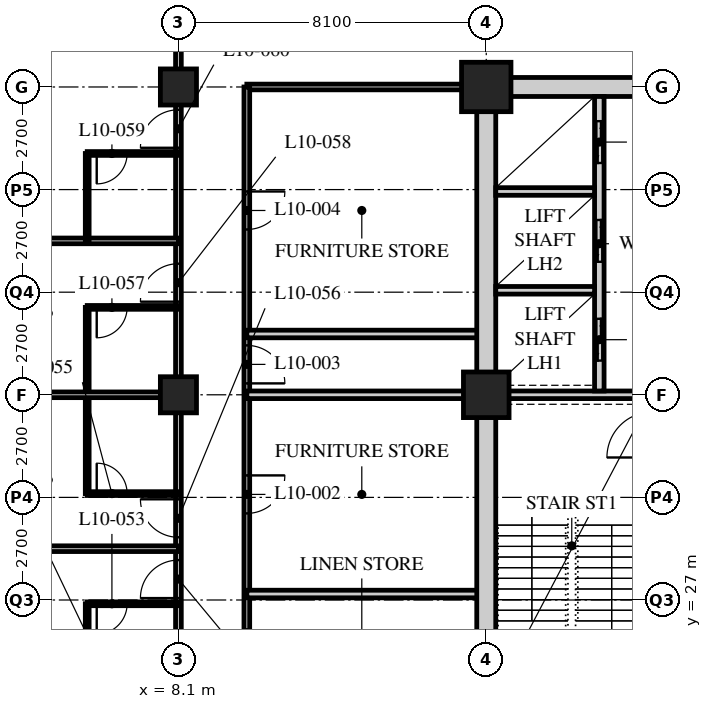
"""IFC4 building model, lengths in metres.
Left out: names, types, materials, properties, quantities, classifications, styles, units other than length and angle.
Written with IfcOpenShell. Run it as: python <this file> out.ifc"""

import sys

from ifc_helpers import new_model, si_unit, direction, frame, frame_2d, origin, origin_2d, place, context, subcontext, project, spatial, rectangle, hollow_rectangle, extrude, element, fill, save


model = new_model("IFC4")
c1 = context("Model", 3, precision=1e-05, world=origin(), true_north=direction((0.0, 1.0)))
c2 = subcontext(c1, "Body", "Model", "MODEL_VIEW")
j1 = project(units=[si_unit("LENGTHUNIT", "METRE"), si_unit("PLANEANGLEUNIT", "RADIAN")], contexts=[c1])
p1 = place(None, origin())
s1 = spatial("IfcSite", under=j1, at=p1, CompositionType="ELEMENT")
p2 = place(p1, origin())
s2 = spatial("IfcBuilding", under=s1, at=p2, CompositionType="ELEMENT")
p3 = place(p2, frame((0.0, 0.0, 46.6)))
s3 = spatial("IfcBuildingStorey", under=s2, at=p3, CompositionType="ELEMENT", Elevation=46.6)
for number, where, z_axis, x_axis in (
    (1, (8.1, 32.4, 0.0), (0.0, 0.0, 1.0), (1.0, 0.0, 0.0)),
    (2, (8.1, 40.5, 0.0), (0.0, 0.0, 1.0), (1.0, 0.0, 0.0)),
):
    element("IfcColumn", number, at=place(p3, frame(where, z_axis=z_axis, x_axis=x_axis)), inside=s3, PredefinedType="COLUMN", context=c2, shape_type="SweptSolid", body=[
        extrude(hollow_rectangle(XDim=0.95, YDim=0.95, WallThickness=0.095, at=origin_2d()), origin(), (0.0, 0.0, 1.0), 3.4),
    ])
p4 = place(p3, frame((16.2, 32.4, 0.0), z_axis=(0.0, 0.0, 1.0), x_axis=(1.0, 0.0, 0.0)))
e3 = element("IfcColumn", 3, at=p4, inside=s3, PredefinedType="COLUMN", context=c2, shape_type="SweptSolid", body=[
    extrude(hollow_rectangle(XDim=1.2, YDim=1.2, WallThickness=0.12, at=origin_2d()), origin(), (0.0, 0.0, 1.0), 3.4),
])
p5 = place(p3, frame((16.2, 40.5, 0.0), z_axis=(0.0, 0.0, 1.0), x_axis=(1.0, 0.0, 0.0)))
e4 = element("IfcColumn", 4, at=p5, inside=s3, PredefinedType="COLUMN", context=c2, shape_type="SweptSolid", body=[
    extrude(hollow_rectangle(XDim=1.3, YDim=1.3, WallThickness=0.13, at=origin_2d()), origin(), (0.0, 0.0, 1.0), 3.4),
])
p6 = place(p3, frame((8.1, 16.2, 0.0), z_axis=(0.0, 0.0, 1.0), x_axis=(0.0, 1.0, 0.0)))
e5 = element("IfcWall", 5, at=p6, inside=s3, PredefinedType="PARTITIONING", context=c2, shape_type="SweptSolid", body=[
    extrude(rectangle(XDim=26.1, YDim=0.15, at=frame_2d((13.05, 0.0))), origin(), (0.0, 0.0, 1.0), 2.578),
])
p7 = place(p6, frame((2.75, 0.0, 0.0)))
e6 = element("IfcOpeningElement", 6, at=p7, cuts=e5, PredefinedType="OPENING", context=c2, shape_type="SweptSolid", body=[
    extrude(rectangle(XDim=1.0, YDim=2.1, at=frame_2d((0.5, 1.05))), frame((0.0, 0.085, 0.0), z_axis=(0.0, -1.0, 0.0), x_axis=(1.0, 0.0, 0.0)), (0.0, 0.0, 1.0), 0.17),
])
p8 = place(p6, frame((4.35, 0.0, 0.0)))
e7 = element("IfcOpeningElement", 7, at=p8, cuts=e5, PredefinedType="OPENING", context=c2, shape_type="SweptSolid", body=[
    extrude(rectangle(XDim=1.0, YDim=2.1, at=frame_2d((0.5, 1.05))), frame((0.0, 0.085, 0.0), z_axis=(0.0, -1.0, 0.0), x_axis=(1.0, 0.0, 0.0)), (0.0, 0.0, 1.0), 0.17),
])
p9 = place(p6, frame((10.85, 0.0, 0.0)))
e8 = element("IfcOpeningElement", 8, at=p9, cuts=e5, PredefinedType="OPENING", context=c2, shape_type="SweptSolid", body=[
    extrude(rectangle(XDim=1.0, YDim=2.1, at=frame_2d((0.5, 1.05))), frame((0.0, 0.085, 0.0), z_axis=(0.0, -1.0, 0.0), x_axis=(1.0, 0.0, 0.0)), (0.0, 0.0, 1.0), 0.17),
])
p10 = place(p6, frame((12.45, 0.0, 0.0)))
e9 = element("IfcOpeningElement", 9, at=p10, cuts=e5, PredefinedType="OPENING", context=c2, shape_type="SweptSolid", body=[
    extrude(rectangle(XDim=1.0, YDim=2.1, at=frame_2d((0.5, 1.05))), frame((0.0, 0.085, 0.0), z_axis=(0.0, -1.0, 0.0), x_axis=(1.0, 0.0, 0.0)), (0.0, 0.0, 1.0), 0.17),
])
p11 = place(p6, frame((18.65, 0.0, 0.0)))
e10 = element("IfcOpeningElement", 10, at=p11, cuts=e5, PredefinedType="OPENING", context=c2, shape_type="SweptSolid", body=[
    extrude(rectangle(XDim=1.0, YDim=2.1, at=frame_2d((0.5, 1.05))), frame((0.0, 0.085, 0.0), z_axis=(0.0, -1.0, 0.0), x_axis=(1.0, 0.0, 0.0)), (0.0, 0.0, 1.0), 0.17),
])
p12 = place(p6, frame((22.7, 0.0, 0.0)))
e11 = element("IfcOpeningElement", 11, at=p12, cuts=e5, PredefinedType="OPENING", context=c2, shape_type="SweptSolid", body=[
    extrude(rectangle(XDim=1.0, YDim=2.1, at=frame_2d((0.5, 1.05))), frame((0.0, 0.085, 0.0), z_axis=(0.0, -1.0, 0.0), x_axis=(1.0, 0.0, 0.0)), (0.0, 0.0, 1.0), 0.17),
])
p13 = place(p3, frame((16.0, 40.5, 0.0), z_axis=(0.0, 0.0, 1.0), x_axis=(-1.0, 0.0, 0.0)))
e12 = element("IfcWall", 12, at=p13, inside=s3, PredefinedType="PARTITIONING", context=c2, shape_type="SweptSolid", body=[
    extrude(rectangle(XDim=6.1, YDim=0.15, at=frame_2d((3.05, 0.0))), origin(), (0.0, 0.0, 1.0), 2.578),
])
p14 = place(p3, frame((9.9, 40.5, 0.0), z_axis=(0.0, 0.0, 1.0), x_axis=(0.0, -1.0, 0.0)))
e13 = element("IfcWall", 13, at=p14, inside=s3, PredefinedType="PARTITIONING", context=c2, shape_type="SweptSolid", body=[
    extrude(rectangle(XDim=22.5, YDim=0.15, at=frame_2d((11.25, 0.0))), origin(), (0.0, 0.0, 1.0), 3.19),
])
p15 = place(p14, frame((14.271, 0.0, 0.0)))
e14 = element("IfcOpeningElement", 14, at=p15, cuts=e13, PredefinedType="OPENING", context=c2, shape_type="SweptSolid", body=[
    extrude(rectangle(XDim=1.0, YDim=2.1, at=frame_2d((0.5, 1.05))), frame((0.0, 0.085, 0.0), z_axis=(0.0, -1.0, 0.0), x_axis=(1.0, 0.0, 0.0)), (0.0, 0.0, 1.0), 0.17),
])
p16 = place(p14, frame((10.221, 0.0, 0.0)))
e15 = element("IfcOpeningElement", 15, at=p16, cuts=e13, PredefinedType="OPENING", context=c2, shape_type="SweptSolid", body=[
    extrude(rectangle(XDim=1.0, YDim=2.1, at=frame_2d((0.5, 1.05))), frame((0.0, 0.085, 0.0), z_axis=(0.0, -1.0, 0.0), x_axis=(1.0, 0.0, 0.0)), (0.0, 0.0, 1.0), 0.17),
])
p17 = place(p14, frame((6.8, 0.0, 0.0)))
e16 = element("IfcOpeningElement", 16, at=p17, cuts=e13, PredefinedType="OPENING", context=c2, shape_type="SweptSolid", body=[
    extrude(rectangle(XDim=1.0, YDim=2.1, at=frame_2d((0.5, 1.05))), frame((0.0, 0.085, 0.0), z_axis=(0.0, -1.0, 0.0), x_axis=(1.0, 0.0, 0.0)), (0.0, 0.0, 1.0), 0.17),
])
p18 = place(p14, frame((2.75, 0.0, 0.0)))
e17 = element("IfcOpeningElement", 17, at=p18, cuts=e13, PredefinedType="OPENING", context=c2, shape_type="SweptSolid", body=[
    extrude(rectangle(XDim=1.0, YDim=2.1, at=frame_2d((0.5, 1.05))), frame((0.0, 0.085, 0.0), z_axis=(0.0, -1.0, 0.0), x_axis=(1.0, 0.0, 0.0)), (0.0, 0.0, 1.0), 0.17),
])
p19 = place(p3, frame((9.9, 32.4, 0.0), z_axis=(0.0, 0.0, 1.0), x_axis=(1.0, 0.0, 0.0)))
e18 = element("IfcWall", 18, at=p19, inside=s3, PredefinedType="SOLIDWALL", context=c2, shape_type="SweptSolid", body=[
    extrude(rectangle(XDim=6.3, YDim=0.2, at=frame_2d((3.15, 0.0))), origin(), (0.0, 0.0, 1.0), 2.578),
])
for number, where, z_axis, x_axis in (
    (19, (9.9, 27.157, 0.0), (0.0, 0.0, 1.0), (1.0, 0.0, 0.0)),
    (20, (9.9, 34.0, 0.0), (0.0, 0.0, 1.0), (1.0, 0.0, 0.0)),
):
    element("IfcWall", number, at=place(p3, frame(where, z_axis=z_axis, x_axis=x_axis)), inside=s3, PredefinedType="SOLIDWALL", context=c2, shape_type="SweptSolid", body=[
        extrude(rectangle(XDim=6.3, YDim=0.2, at=frame_2d((3.15, 0.0))), origin(), (0.0, 0.0, 1.0), 3.19),
    ])
p20 = place(p3, frame((5.7, 21.7, 0.0), z_axis=(0.0, 0.0, 1.0), x_axis=(0.0, 1.0, 0.0)))
e21 = element("IfcWall", 21, at=p20, inside=s3, PredefinedType="PARTITIONING", context=c2, shape_type="SweptSolid", body=[
    extrude(rectangle(XDim=5.2, YDim=0.1, at=frame_2d((2.6, 0.0))), origin(), (0.0, 0.0, 1.0), 3.19),
])
p21 = place(p3, frame((8.1, 26.9, 0.0), z_axis=(0.0, 0.0, 1.0), x_axis=(-1.0, 0.0, 0.0)))
e22 = element("IfcWall", 22, at=p21, inside=s3, PredefinedType="PARTITIONING", context=c2, shape_type="SweptSolid", body=[
    extrude(rectangle(XDim=2.4, YDim=0.1, at=frame_2d((1.2, 0.0))), origin(), (0.0, 0.0, 1.0), 3.19),
])
p22 = place(p21, frame((1.35, 0.0, 0.0)))
e23 = element("IfcOpeningElement", 23, at=p22, cuts=e22, PredefinedType="OPENING", context=c2, shape_type="SweptSolid", body=[
    extrude(rectangle(XDim=0.8, YDim=2.1, at=frame_2d((0.4, 1.05))), frame((0.0, 0.06, 0.0), z_axis=(0.0, -1.0, 0.0), x_axis=(1.0, 0.0, 0.0)), (0.0, 0.0, 1.0), 0.12),
])
p23 = place(p3, frame((8.1, 28.35, 0.0), z_axis=(0.0, 0.0, 1.0), x_axis=(-1.0, 0.0, 0.0)))
e24 = element("IfcWall", 24, at=p23, inside=s3, PredefinedType="PARTITIONING", context=c2, shape_type="SweptSolid", body=[
    extrude(rectangle(XDim=7.8, YDim=0.15, at=frame_2d((3.9, 0.0))), origin(), (0.0, 0.0, 1.0), 3.19),
])
p24 = place(p3, frame((5.7, 29.8, 0.0), z_axis=(0.0, 0.0, 1.0), x_axis=(0.0, 1.0, 0.0)))
e25 = element("IfcWall", 25, at=p24, inside=s3, PredefinedType="PARTITIONING", context=c2, shape_type="SweptSolid", body=[
    extrude(rectangle(XDim=4.9, YDim=0.1, at=frame_2d((2.45, 0.0))), origin(), (0.0, 0.0, 1.0), 3.19),
])
p25 = place(p3, frame((8.1, 29.8, 0.0), z_axis=(0.0, 0.0, 1.0), x_axis=(-1.0, 0.0, 0.0)))
e26 = element("IfcWall", 26, at=p25, inside=s3, PredefinedType="PARTITIONING", context=c2, shape_type="SweptSolid", body=[
    extrude(rectangle(XDim=2.4, YDim=0.1, at=frame_2d((1.2, 0.0))), origin(), (0.0, 0.0, 1.0), 3.19),
])
p26 = place(p25, frame((1.35, 0.0, 0.0)))
e27 = element("IfcOpeningElement", 27, at=p26, cuts=e26, PredefinedType="OPENING", context=c2, shape_type="SweptSolid", body=[
    extrude(rectangle(XDim=0.8, YDim=2.1, at=frame_2d((0.4, 1.05))), frame((0.0, 0.06, 0.0), z_axis=(0.0, -1.0, 0.0), x_axis=(1.0, 0.0, 0.0)), (0.0, 0.0, 1.0), 0.12),
])
p27 = place(p3, frame((8.1, 32.4, 0.0), z_axis=(0.0, 0.0, 1.0), x_axis=(-1.0, 0.0, 0.0)))
e28 = element("IfcWall", 28, at=p27, inside=s3, PredefinedType="PARTITIONING", context=c2, shape_type="SweptSolid", body=[
    extrude(rectangle(XDim=7.8, YDim=0.15, at=frame_2d((3.9, 0.0))), origin(), (0.0, 0.0, 1.0), 2.578),
])
p28 = place(p3, frame((8.1, 34.7, 0.0), z_axis=(0.0, 0.0, 1.0), x_axis=(-1.0, 0.0, 0.0)))
e29 = element("IfcWall", 29, at=p28, inside=s3, PredefinedType="PARTITIONING", context=c2, shape_type="SweptSolid", body=[
    extrude(rectangle(XDim=2.4, YDim=0.1, at=frame_2d((1.2, 0.0))), origin(), (0.0, 0.0, 1.0), 3.19),
])
p29 = place(p28, frame((1.35, 0.0, 0.0)))
e30 = element("IfcOpeningElement", 30, at=p29, cuts=e29, PredefinedType="OPENING", context=c2, shape_type="SweptSolid", body=[
    extrude(rectangle(XDim=0.8, YDim=2.1, at=frame_2d((0.4, 1.05))), frame((0.0, 0.06, 0.0), z_axis=(0.0, -1.0, 0.0), x_axis=(1.0, 0.0, 0.0)), (0.0, 0.0, 1.0), 0.12),
])
p30 = place(p3, frame((8.1, 36.45, 0.0), z_axis=(0.0, 0.0, 1.0), x_axis=(-1.0, 0.0, 0.0)))
e31 = element("IfcWall", 31, at=p30, inside=s3, PredefinedType="PARTITIONING", context=c2, shape_type="SweptSolid", body=[
    extrude(rectangle(XDim=7.8, YDim=0.15, at=frame_2d((3.9, 0.0))), origin(), (0.0, 0.0, 1.0), 3.19),
])
p31 = place(p3, frame((5.7, 36.45, 0.0), z_axis=(0.0, 0.0, 1.0), x_axis=(0.0, 1.0, 0.0)))
e32 = element("IfcWall", 32, at=p31, inside=s3, PredefinedType="PARTITIONING", context=c2, shape_type="SweptSolid", body=[
    extrude(rectangle(XDim=2.3, YDim=0.1, at=frame_2d((1.15, 0.0))), origin(), (0.0, 0.0, 1.0), 3.19),
])
p32 = place(p3, frame((8.1, 38.75, 0.0), z_axis=(0.0, 0.0, 1.0), x_axis=(-1.0, 0.0, 0.0)))
e33 = element("IfcWall", 33, at=p32, inside=s3, PredefinedType="PARTITIONING", context=c2, shape_type="SweptSolid", body=[
    extrude(rectangle(XDim=2.4, YDim=0.1, at=frame_2d((1.2, 0.0))), origin(), (0.0, 0.0, 1.0), 3.19),
])
p33 = place(p32, frame((1.35, 0.0, 0.0)))
e34 = element("IfcOpeningElement", 34, at=p33, cuts=e33, PredefinedType="OPENING", context=c2, shape_type="SweptSolid", body=[
    extrude(rectangle(XDim=0.8, YDim=2.1, at=frame_2d((0.4, 1.05))), frame((0.0, 0.06, 0.0), z_axis=(0.0, -1.0, 0.0), x_axis=(1.0, 0.0, 0.0)), (0.0, 0.0, 1.0), 0.12),
])
p34 = place(p3, frame((15.95, 40.5, 0.0), z_axis=(0.0, 0.0, 1.0), x_axis=(1.0, 0.0, 0.0)))
e35 = element("IfcWall", 35, at=p34, inside=s3, PredefinedType="SOLIDWALL", context=c2, shape_type="SweptSolid", body=[
    extrude(rectangle(XDim=24.8, YDim=0.5, at=frame_2d((12.4, 0.0))), origin(), (0.0, 0.0, 1.0), 2.54),
])
p35 = place(p34, frame((11.5, 0.0, 0.0)))
e36 = element("IfcOpeningElement", 36, at=p35, cuts=e35, PredefinedType="OPENING", context=c2, shape_type="SweptSolid", body=[
    extrude(rectangle(XDim=1.8, YDim=2.4, at=frame_2d((0.9, 1.2))), frame((0.0, 0.26, 0.0), z_axis=(0.0, -1.0, 0.0), x_axis=(1.0, 0.0, 0.0)), (0.0, 0.0, 1.0), 0.52),
])
p36 = place(p3, frame((16.2, 24.55, 0.0), z_axis=(0.0, 0.0, 1.0), x_axis=(0.0, 1.0, 0.0)))
e37 = element("IfcWall", 37, at=p36, inside=s3, PredefinedType="SOLIDWALL", context=c2, shape_type="SweptSolid", body=[
    extrude(rectangle(XDim=15.7, YDim=0.5, at=frame_2d((7.85, 0.0))), origin(), (0.0, 0.0, 1.0), 2.578),
])
p37 = place(p3, frame((16.45, 32.4, 0.0), z_axis=(0.0, 0.0, 1.0), x_axis=(1.0, 0.0, 0.0)))
e38 = element("IfcWall", 38, at=p37, inside=s3, PredefinedType="SOLIDWALL", context=c2, shape_type="SweptSolid", body=[
    extrude(rectangle(XDim=7.95, YDim=0.2, at=frame_2d((3.975, 0.0))), origin(), (0.0, 0.0, 1.0), 2.578),
])
p38 = place(p3, frame((19.175, 32.5, 0.0), z_axis=(0.0, 0.0, 1.0), x_axis=(0.0, 1.0, 0.0)))
e39 = element("IfcWall", 39, at=p38, inside=s3, PredefinedType="SOLIDWALL", context=c2, shape_type="SweptSolid", body=[
    extrude(rectangle(XDim=7.75, YDim=0.25, at=frame_2d((3.875, 0.0))), origin(), (0.0, 0.0, 1.0), 3.19),
])
p39 = place(p38, frame((0.8, 0.0, 0.0)))
e40 = element("IfcOpeningElement", 40, at=p39, cuts=e39, PredefinedType="OPENING", context=c2, shape_type="SweptSolid", body=[
    extrude(rectangle(XDim=1.1, YDim=2.4, at=frame_2d((0.55, 1.2))), frame((0.0, 0.135, 0.0), z_axis=(0.0, -1.0, 0.0), x_axis=(1.0, 0.0, 0.0)), (0.0, 0.0, 1.0), 0.27),
])
p40 = place(p38, frame((3.4, 0.0, 0.0)))
e41 = element("IfcOpeningElement", 41, at=p40, cuts=e39, PredefinedType="OPENING", context=c2, shape_type="SweptSolid", body=[
    extrude(rectangle(XDim=1.1, YDim=2.4, at=frame_2d((0.55, 1.2))), frame((0.0, 0.135, 0.0), z_axis=(0.0, -1.0, 0.0), x_axis=(1.0, 0.0, 0.0)), (0.0, 0.0, 1.0), 0.27),
])
p41 = place(p38, frame((6.0, 0.0, 0.0)))
e42 = element("IfcOpeningElement", 42, at=p41, cuts=e39, PredefinedType="OPENING", context=c2, shape_type="SweptSolid", body=[
    extrude(rectangle(XDim=1.1, YDim=2.4, at=frame_2d((0.55, 1.2))), frame((0.0, 0.135, 0.0), z_axis=(0.0, -1.0, 0.0), x_axis=(1.0, 0.0, 0.0)), (0.0, 0.0, 1.0), 0.27),
])
for number, where, z_axis, x_axis in (
    (43, (16.45, 35.15, 0.0), (0.0, 0.0, 1.0), (1.0, 0.0, 0.0)),
    (44, (16.45, 37.75, 0.0), (0.0, 0.0, 1.0), (1.0, 0.0, 0.0)),
):
    element("IfcWall", number, at=place(p3, frame(where, z_axis=z_axis, x_axis=x_axis)), inside=s3, PredefinedType="SOLIDWALL", context=c2, shape_type="SweptSolid", body=[
        extrude(rectangle(XDim=2.6, YDim=0.2, at=frame_2d((1.3, 0.0))), origin(), (0.0, 0.0, 1.0), 3.19),
    ])
p42 = place(p16, origin())
e45 = element("IfcDoor", 45, at=p42, inside=s3, OperationType="SINGLE_SWING_LEFT", PredefinedType="DOOR", context=c2, shape_type="SweptSolid", body=[
    extrude(rectangle(XDim=1.0, YDim=2.1, at=frame_2d((0.5, 1.05))), frame((0.0, 0.025, 0.0), z_axis=(0.0, -1.0, 0.0), x_axis=(1.0, 0.0, 0.0)), (0.0, 0.0, 1.0), 0.05),
])
fill(e15, e45)
p43 = place(p17, origin())
e46 = element("IfcDoor", 46, at=p43, inside=s3, OperationType="SINGLE_SWING_RIGHT", PredefinedType="DOOR", context=c2, shape_type="SweptSolid", body=[
    extrude(rectangle(XDim=1.0, YDim=2.1, at=frame_2d((0.5, 1.05))), frame((0.0, 0.025, 0.0), z_axis=(0.0, -1.0, 0.0), x_axis=(1.0, 0.0, 0.0)), (0.0, 0.0, 1.0), 0.05),
])
fill(e16, e46)
p44 = place(p18, origin())
e47 = element("IfcDoor", 47, at=p44, inside=s3, OperationType="SINGLE_SWING_LEFT", PredefinedType="DOOR", context=c2, shape_type="SweptSolid", body=[
    extrude(rectangle(XDim=1.0, YDim=2.1, at=frame_2d((0.5, 1.05))), frame((0.0, 0.025, 0.0), z_axis=(0.0, -1.0, 0.0), x_axis=(1.0, 0.0, 0.0)), (0.0, 0.0, 1.0), 0.05),
])
fill(e17, e47)
p45 = place(p22, origin())
e48 = element("IfcDoor", 48, at=p45, inside=s3, OperationType="SINGLE_SWING_RIGHT", PredefinedType="DOOR", context=c2, shape_type="SweptSolid", body=[
    extrude(rectangle(XDim=0.8, YDim=2.1, at=frame_2d((0.4, 1.05))), frame((0.0, 0.025, 0.0), z_axis=(0.0, -1.0, 0.0), x_axis=(1.0, 0.0, 0.0)), (0.0, 0.0, 1.0), 0.05),
])
fill(e23, e48)
p46 = place(p9, origin())
e49 = element("IfcDoor", 49, at=p46, inside=s3, OperationType="SINGLE_SWING_LEFT", PredefinedType="DOOR", context=c2, shape_type="SweptSolid", body=[
    extrude(rectangle(XDim=1.0, YDim=2.1, at=frame_2d((0.5, 1.05))), frame((0.0, 0.025, 0.0), z_axis=(0.0, -1.0, 0.0), x_axis=(1.0, 0.0, 0.0)), (0.0, 0.0, 1.0), 0.05),
])
fill(e8, e49)
p47 = place(p26, origin())
e50 = element("IfcDoor", 50, at=p47, inside=s3, OperationType="SINGLE_SWING_LEFT", PredefinedType="DOOR", context=c2, shape_type="SweptSolid", body=[
    extrude(rectangle(XDim=0.8, YDim=2.1, at=frame_2d((0.4, 1.05))), frame((0.0, 0.025, 0.0), z_axis=(0.0, -1.0, 0.0), x_axis=(1.0, 0.0, 0.0)), (0.0, 0.0, 1.0), 0.05),
])
fill(e27, e50)
p48 = place(p10, origin())
e51 = element("IfcDoor", 51, at=p48, inside=s3, OperationType="SINGLE_SWING_RIGHT", PredefinedType="DOOR", context=c2, shape_type="SweptSolid", body=[
    extrude(rectangle(XDim=1.0, YDim=2.1, at=frame_2d((0.5, 1.05))), frame((0.0, 0.025, 0.0), z_axis=(0.0, -1.0, 0.0), x_axis=(1.0, 0.0, 0.0)), (0.0, 0.0, 1.0), 0.05),
])
fill(e9, e51)
p49 = place(p29, origin())
e52 = element("IfcDoor", 52, at=p49, inside=s3, OperationType="SINGLE_SWING_RIGHT", PredefinedType="DOOR", context=c2, shape_type="SweptSolid", body=[
    extrude(rectangle(XDim=0.8, YDim=2.1, at=frame_2d((0.4, 1.05))), frame((0.0, 0.025, 0.0), z_axis=(0.0, -1.0, 0.0), x_axis=(1.0, 0.0, 0.0)), (0.0, 0.0, 1.0), 0.05),
])
fill(e30, e52)
p50 = place(p11, origin())
e53 = element("IfcDoor", 53, at=p50, inside=s3, OperationType="SINGLE_SWING_LEFT", PredefinedType="DOOR", context=c2, shape_type="SweptSolid", body=[
    extrude(rectangle(XDim=1.0, YDim=2.1, at=frame_2d((0.5, 1.05))), frame((0.0, 0.025, 0.0), z_axis=(0.0, -1.0, 0.0), x_axis=(1.0, 0.0, 0.0)), (0.0, 0.0, 1.0), 0.05),
])
fill(e10, e53)
p51 = place(p33, origin())
e54 = element("IfcDoor", 54, at=p51, inside=s3, OperationType="SINGLE_SWING_RIGHT", PredefinedType="DOOR", context=c2, shape_type="SweptSolid", body=[
    extrude(rectangle(XDim=0.8, YDim=2.1, at=frame_2d((0.4, 1.05))), frame((0.0, 0.025, 0.0), z_axis=(0.0, -1.0, 0.0), x_axis=(1.0, 0.0, 0.0)), (0.0, 0.0, 1.0), 0.05),
])
fill(e34, e54)
p52 = place(p12, origin())
e55 = element("IfcDoor", 55, at=p52, inside=s3, OperationType="SINGLE_SWING_LEFT", PredefinedType="DOOR", context=c2, shape_type="SweptSolid", body=[
    extrude(rectangle(XDim=1.0, YDim=2.1, at=frame_2d((0.5, 1.05))), frame((0.0, 0.025, 0.0), z_axis=(0.0, -1.0, 0.0), x_axis=(1.0, 0.0, 0.0)), (0.0, 0.0, 1.0), 0.05),
])
fill(e11, e55)
p53 = place(p39, origin())
e56 = element("IfcDoor", 56, at=p53, inside=s3, OperationType="DOUBLE_DOOR_SLIDING", PredefinedType="DOOR", context=c2, shape_type="SweptSolid", body=[
    extrude(rectangle(XDim=1.1, YDim=2.4, at=frame_2d((0.55, 1.2))), frame((0.0, 0.025, 0.0), z_axis=(0.0, -1.0, 0.0), x_axis=(1.0, 0.0, 0.0)), (0.0, 0.0, 1.0), 0.05),
])
fill(e40, e56)
p54 = place(p40, origin())
e57 = element("IfcDoor", 57, at=p54, inside=s3, OperationType="DOUBLE_DOOR_SLIDING", PredefinedType="DOOR", context=c2, shape_type="SweptSolid", body=[
    extrude(rectangle(XDim=1.1, YDim=2.4, at=frame_2d((0.55, 1.2))), frame((0.0, 0.025, 0.0), z_axis=(0.0, -1.0, 0.0), x_axis=(1.0, 0.0, 0.0)), (0.0, 0.0, 1.0), 0.05),
])
fill(e41, e57)
p55 = place(p41, origin())
e58 = element("IfcDoor", 58, at=p55, inside=s3, OperationType="DOUBLE_DOOR_SLIDING", PredefinedType="DOOR", context=c2, shape_type="SweptSolid", body=[
    extrude(rectangle(XDim=1.1, YDim=2.4, at=frame_2d((0.55, 1.2))), frame((0.0, 0.025, 0.0), z_axis=(0.0, -1.0, 0.0), x_axis=(1.0, 0.0, 0.0)), (0.0, 0.0, 1.0), 0.05),
])
fill(e42, e58)
save(model, sys.argv[1])
